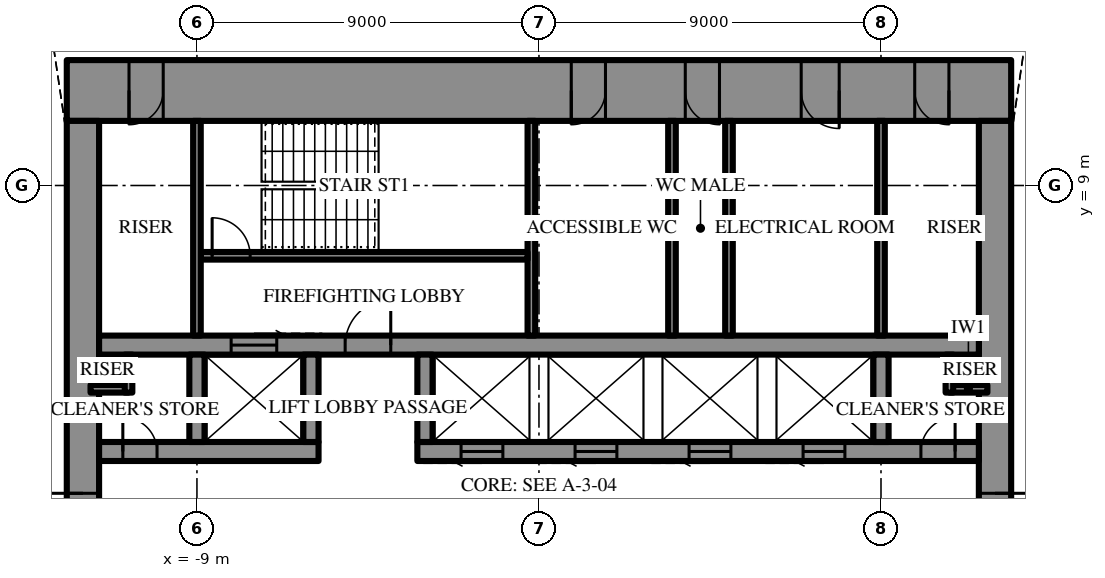
"""IFC4 building model, lengths in metres.
Left out: names, types, materials, properties, quantities, classifications, styles, units other than length and angle.
Written with IfcOpenShell. Run it as: python <this file> out.ifc"""

import sys

from ifc_helpers import new_model, si_unit, direction, frame, frame_2d, origin, place, context, subcontext, project, spatial, rectangle, extrude, element, fill, save


model = new_model("IFC4")
c1 = context("Model", 3, precision=1e-05, world=origin(), true_north=direction((0.0, 1.0)))
c2 = subcontext(c1, "Body", "Model", "MODEL_VIEW")
j1 = project(units=[si_unit("LENGTHUNIT", "METRE"), si_unit("PLANEANGLEUNIT", "RADIAN")], contexts=[c1])
p1 = place(None, origin())
s1 = spatial("IfcSite", under=j1, at=p1, CompositionType="ELEMENT")
p2 = place(p1, origin())
s2 = spatial("IfcBuilding", under=s1, at=p2, CompositionType="ELEMENT")
p3 = place(p2, frame((0.0, 0.0, 336.7)))
s3 = spatial("IfcBuildingStorey", under=s2, at=p3, CompositionType="ELEMENT", Elevation=336.7)
p4 = place(p3, frame((-12.425, 11.5, 0.0), z_axis=(0.0, 0.0, 1.0), x_axis=(1.0, 0.0, 0.0)))
e1 = element("IfcWall", 1, at=p4, inside=s3, PredefinedType="SHEAR", context=c2, shape_type="SweptSolid", body=[
    extrude(rectangle(XDim=24.85, YDim=1.6, at=frame_2d((12.425, 0.0))), origin(), (0.0, 0.0, 1.0), 4.2),
])
p5 = place(p4, frame((13.275, 0.0, 0.0)))
e2 = element("IfcOpeningElement", 2, at=p5, cuts=e1, PredefinedType="OPENING", context=c2, shape_type="SweptSolid", body=[
    extrude(rectangle(XDim=0.9, YDim=2.2, at=frame_2d((0.45, 1.1))), frame((0.0, 0.81, 0.0), z_axis=(0.0, -1.0, 0.0), x_axis=(1.0, 0.0, 0.0)), (0.0, 0.0, 1.0), 1.62),
])
p6 = place(p4, frame((16.275, 0.0, 0.0)))
e3 = element("IfcOpeningElement", 3, at=p6, cuts=e1, PredefinedType="OPENING", context=c2, shape_type="SweptSolid", body=[
    extrude(rectangle(XDim=0.9, YDim=2.2, at=frame_2d((0.45, 1.1))), frame((0.0, 0.81, 0.0), z_axis=(0.0, -1.0, 0.0), x_axis=(1.0, 0.0, 0.0)), (0.0, 0.0, 1.0), 1.62),
])
p7 = place(p4, frame((19.325, 0.0, 0.0)))
e4 = element("IfcOpeningElement", 4, at=p7, cuts=e1, PredefinedType="OPENING", context=c2, shape_type="SweptSolid", body=[
    extrude(rectangle(XDim=1.0, YDim=2.2, at=frame_2d((0.5, 1.1))), frame((0.0, 0.81, 0.0), z_axis=(0.0, -1.0, 0.0), x_axis=(1.0, 0.0, 0.0)), (0.0, 0.0, 1.0), 1.62),
])
p8 = place(p4, frame((1.637, 0.0, 0.0)))
e5 = element("IfcOpeningElement", 5, at=p8, cuts=e1, PredefinedType="OPENING", context=c2, shape_type="SweptSolid", body=[
    extrude(rectangle(XDim=0.9, YDim=2.2, at=frame_2d((0.45, 1.1))), frame((0.0, 0.81, 0.0), z_axis=(0.0, -1.0, 0.0), x_axis=(1.0, 0.0, 0.0)), (0.0, 0.0, 1.0), 1.62),
])
p9 = place(p4, frame((22.312, 0.0, 0.0)))
e6 = element("IfcOpeningElement", 6, at=p9, cuts=e1, PredefinedType="OPENING", context=c2, shape_type="SweptSolid", body=[
    extrude(rectangle(XDim=0.9, YDim=2.2, at=frame_2d((0.45, 1.1))), frame((0.0, 0.81, 0.0), z_axis=(0.0, -1.0, 0.0), x_axis=(1.0, 0.0, 0.0)), (0.0, 0.0, 1.0), 1.62),
])
p10 = place(p3, frame((12.0, -10.7, 0.0), z_axis=(0.0, 0.0, 1.0), x_axis=(0.0, 1.0, 0.0)))
e7 = element("IfcWall", 7, at=p10, inside=s3, PredefinedType="SHEAR", context=c2, shape_type="SweptSolid", body=[
    extrude(rectangle(XDim=21.4, YDim=0.85, at=frame_2d((10.7, 0.0))), origin(), (0.0, 0.0, 1.0), 4.2),
])
p11 = place(p10, frame((9.8, 0.0, 0.0)))
e8 = element("IfcOpeningElement", 8, at=p11, cuts=e7, PredefinedType="OPENING", context=c2, shape_type="SweptSolid", body=[
    extrude(rectangle(XDim=1.8, YDim=2.4, at=frame_2d((0.9, 1.2))), frame((0.0, 0.435, 0.0), z_axis=(0.0, -1.0, 0.0), x_axis=(1.0, 0.0, 0.0)), (0.0, 0.0, 1.0), 0.87),
])
p12 = place(p3, frame((-12.0, 10.7, 0.0), z_axis=(0.0, 0.0, 1.0), x_axis=(0.0, -1.0, 0.0)))
e9 = element("IfcWall", 9, at=p12, inside=s3, PredefinedType="SHEAR", context=c2, shape_type="SweptSolid", body=[
    extrude(rectangle(XDim=21.4, YDim=0.85, at=frame_2d((10.7, 0.0))), origin(), (0.0, 0.0, 1.0), 4.2),
])
p13 = place(p12, frame((9.8, 0.0, 0.0)))
e10 = element("IfcOpeningElement", 10, at=p13, cuts=e9, PredefinedType="OPENING", context=c2, shape_type="SweptSolid", body=[
    extrude(rectangle(XDim=1.8, YDim=2.4, at=frame_2d((0.9, 1.2))), frame((0.0, 0.435, 0.0), z_axis=(0.0, -1.0, 0.0), x_axis=(1.0, 0.0, 0.0)), (0.0, 0.0, 1.0), 0.87),
])
p14 = place(p3, frame((-11.575, 2.0, 0.0), z_axis=(0.0, 0.0, 1.0), x_axis=(1.0, 0.0, 0.0)))
e11 = element("IfcWall", 11, at=p14, inside=s3, PredefinedType="SHEAR", context=c2, shape_type="SweptSolid", body=[
    extrude(rectangle(XDim=5.775, YDim=0.5, at=frame_2d((2.887, 0.0))), origin(), (0.0, 0.0, 1.0), 4.2),
])
p15 = place(p14, frame((0.625, 0.0, 0.0)))
e12 = element("IfcOpeningElement", 12, at=p15, cuts=e11, PredefinedType="OPENING", context=c2, shape_type="SweptSolid", body=[
    extrude(rectangle(XDim=0.9, YDim=2.2, at=frame_2d((0.45, 1.1))), frame((0.0, 0.26, 0.0), z_axis=(0.0, -1.0, 0.0), x_axis=(1.0, 0.0, 0.0)), (0.0, 0.0, 1.0), 0.52),
])
p16 = place(p3, frame((-3.2, 2.0, 0.0), z_axis=(0.0, 0.0, 1.0), x_axis=(1.0, 0.0, 0.0)))
e13 = element("IfcWall", 13, at=p16, inside=s3, PredefinedType="SHEAR", context=c2, shape_type="SweptSolid", body=[
    extrude(rectangle(XDim=14.775, YDim=0.5, at=frame_2d((7.387, 0.0))), origin(), (0.0, 0.0, 1.0), 4.2),
])
p17 = place(p16, frame((13.25, 0.0, 0.0)))
e14 = element("IfcOpeningElement", 14, at=p17, cuts=e13, PredefinedType="OPENING", context=c2, shape_type="SweptSolid", body=[
    extrude(rectangle(XDim=0.9, YDim=2.2, at=frame_2d((0.45, 1.1))), frame((0.0, 0.26, 0.0), z_axis=(0.0, -1.0, 0.0), x_axis=(1.0, 0.0, 0.0)), (0.0, 0.0, 1.0), 0.52),
])
p18 = place(p16, frame((1.15, 0.0, 0.0)))
e15 = element("IfcOpeningElement", 15, at=p18, cuts=e13, PredefinedType="OPENING", context=c2, shape_type="SweptSolid", body=[
    extrude(rectangle(XDim=1.1, YDim=2.2, at=frame_2d((0.55, 1.1))), frame((0.0, 0.26, 0.0), z_axis=(0.0, -1.0, 0.0), x_axis=(1.0, 0.0, 0.0)), (0.0, 0.0, 1.0), 0.52),
])
p19 = place(p16, frame((4.15, 0.0, 0.0)))
e16 = element("IfcOpeningElement", 16, at=p19, cuts=e13, PredefinedType="OPENING", context=c2, shape_type="SweptSolid", body=[
    extrude(rectangle(XDim=1.1, YDim=2.2, at=frame_2d((0.55, 1.1))), frame((0.0, 0.26, 0.0), z_axis=(0.0, -1.0, 0.0), x_axis=(1.0, 0.0, 0.0)), (0.0, 0.0, 1.0), 0.52),
])
p20 = place(p16, frame((7.15, 0.0, 0.0)))
e17 = element("IfcOpeningElement", 17, at=p20, cuts=e13, PredefinedType="OPENING", context=c2, shape_type="SweptSolid", body=[
    extrude(rectangle(XDim=1.1, YDim=2.2, at=frame_2d((0.55, 1.1))), frame((0.0, 0.26, 0.0), z_axis=(0.0, -1.0, 0.0), x_axis=(1.0, 0.0, 0.0)), (0.0, 0.0, 1.0), 0.52),
])
p21 = place(p16, frame((10.15, 0.0, 0.0)))
e18 = element("IfcOpeningElement", 18, at=p21, cuts=e13, PredefinedType="OPENING", context=c2, shape_type="SweptSolid", body=[
    extrude(rectangle(XDim=1.1, YDim=2.2, at=frame_2d((0.55, 1.1))), frame((0.0, 0.26, 0.0), z_axis=(0.0, -1.0, 0.0), x_axis=(1.0, 0.0, 0.0)), (0.0, 0.0, 1.0), 0.52),
])
p22 = place(p3, frame((-11.575, 4.8, 0.0), z_axis=(0.0, 0.0, 1.0), x_axis=(1.0, 0.0, 0.0)))
e19 = element("IfcWall", 19, at=p22, inside=s3, PredefinedType="SHEAR", context=c2, shape_type="SweptSolid", body=[
    extrude(rectangle(XDim=23.15, YDim=0.5, at=frame_2d((11.575, 0.0))), origin(), (0.0, 0.0, 1.0), 4.2),
])
p23 = place(p22, frame((6.475, 0.0, 0.0)))
e20 = element("IfcOpeningElement", 20, at=p23, cuts=e19, PredefinedType="OPENING", context=c2, shape_type="SweptSolid", body=[
    extrude(rectangle(XDim=1.2, YDim=2.2, at=frame_2d((0.6, 1.1))), frame((0.0, 0.26, 0.0), z_axis=(0.0, -1.0, 0.0), x_axis=(1.0, 0.0, 0.0)), (0.0, 0.0, 1.0), 0.52),
])
p24 = place(p22, frame((3.475, 0.0, 0.0)))
e21 = element("IfcOpeningElement", 21, at=p24, cuts=e19, PredefinedType="OPENING", context=c2, shape_type="SweptSolid", body=[
    extrude(rectangle(XDim=1.2, YDim=2.2, at=frame_2d((0.6, 1.1))), frame((0.0, 0.26, 0.0), z_axis=(0.0, -1.0, 0.0), x_axis=(1.0, 0.0, 0.0)), (0.0, 0.0, 1.0), 0.52),
])
for number, where, z_axis, x_axis in (
    (22, (-9.0, 2.25, 0.0), (0.0, 0.0, 1.0), (0.0, 1.0, 0.0)),
    (23, (-6.0, 2.25, 0.0), (0.0, 0.0, 1.0), (0.0, 1.0, 0.0)),
    (24, (-3.0, 2.25, 0.0), (0.0, 0.0, 1.0), (0.0, 1.0, 0.0)),
    (25, (9.0, 2.25, 0.0), (0.0, 0.0, 1.0), (0.0, 1.0, 0.0)),
):
    element("IfcWall", number, at=place(p3, frame(where, z_axis=z_axis, x_axis=x_axis)), inside=s3, PredefinedType="SHEAR", context=c2, shape_type="SweptSolid", body=[
        extrude(rectangle(XDim=2.3, YDim=0.4, at=frame_2d((1.15, 0.0))), origin(), (0.0, 0.0, 1.0), 4.2),
    ])
p25 = place(p3, frame((-0.2, 5.05, 0.0), z_axis=(0.0, 0.0, 1.0), x_axis=(0.0, 1.0, 0.0)))
e26 = element("IfcWall", 26, at=p25, inside=s3, PredefinedType="SHEAR", context=c2, shape_type="SweptSolid", body=[
    extrude(rectangle(XDim=5.65, YDim=0.2, at=frame_2d((2.825, 0.0))), origin(), (0.0, 0.0, 1.0), 4.2),
])
p26 = place(p3, frame((-8.9, 7.15, 0.0), z_axis=(0.0, 0.0, 1.0), x_axis=(1.0, 0.0, 0.0)))
e27 = element("IfcWall", 27, at=p26, inside=s3, PredefinedType="SHEAR", context=c2, shape_type="SweptSolid", body=[
    extrude(rectangle(XDim=8.6, YDim=0.2, at=frame_2d((4.3, 0.0))), origin(), (0.0, 0.0, 1.0), 4.2),
])
p27 = place(p26, frame((0.3, 0.0, 0.0)))
e28 = element("IfcOpeningElement", 28, at=p27, cuts=e27, PredefinedType="OPENING", context=c2, shape_type="SweptSolid", body=[
    extrude(rectangle(XDim=1.0, YDim=2.2, at=frame_2d((0.5, 1.1))), frame((0.0, 0.11, 0.0), z_axis=(0.0, -1.0, 0.0), x_axis=(1.0, 0.0, 0.0)), (0.0, 0.0, 1.0), 0.22),
])
for number, where, z_axis, x_axis in (
    (29, (-9.0, 5.05, 0.0), (0.0, 0.0, 1.0), (0.0, 1.0, 0.0)),
    (30, (9.0, 5.05, 0.0), (0.0, 0.0, 1.0), (0.0, 1.0, 0.0)),
    (31, (3.5, 5.05, 0.0), (0.0, 0.0, 1.0), (0.0, 1.0, 0.0)),
    (32, (5.0, 5.05, 0.0), (0.0, 0.0, 1.0), (0.0, 1.0, 0.0)),
):
    element("IfcWall", number, at=place(p3, frame(where, z_axis=z_axis, x_axis=x_axis)), inside=s3, PredefinedType="PARTITIONING", context=c2, shape_type="SweptSolid", body=[
        extrude(rectangle(XDim=5.65, YDim=0.2, at=frame_2d((2.825, 0.0))), origin(), (0.0, 0.0, 1.0), 4.0),
    ])
for number, where, z_axis, x_axis in (
    (33, (-11.8, 3.65, 0.0), (0.0, 0.0, 1.0), (1.0, 0.0, 0.0)),
    (34, (-10.8, 3.55, 0.0), (0.0, 0.0, 1.0), (0.0, 1.0, 0.0)),
    (35, (10.8, 3.65, 0.0), (0.0, 0.0, 1.0), (1.0, 0.0, 0.0)),
    (36, (10.8, 3.55, 0.0), (0.0, 0.0, 1.0), (0.0, 1.0, 0.0)),
):
    element("IfcWall", number, at=place(p3, frame(where, z_axis=z_axis, x_axis=x_axis)), inside=s3, PredefinedType="PARTITIONING", context=c2, shape_type="SweptSolid", body=[
        extrude(rectangle(XDim=1.0, YDim=0.2, at=frame_2d((0.5, 0.0))), origin(), (0.0, 0.0, 1.0), 4.0),
    ])
p28 = place(p11, frame((1.8, 0.0, 0.0), z_axis=(0.0, 0.0, 1.0), x_axis=(-1.0, 0.0, 0.0)))
e37 = element("IfcDoor", 37, at=p28, inside=s3, OperationType="DOUBLE_DOOR_SINGLE_SWING", PredefinedType="DOOR", context=c2, shape_type="SweptSolid", body=[
    extrude(rectangle(XDim=1.8, YDim=2.4, at=frame_2d((0.9, 1.2))), frame((0.0, 0.025, 0.0), z_axis=(0.0, -1.0, 0.0), x_axis=(1.0, 0.0, 0.0)), (0.0, 0.0, 1.0), 0.05),
])
fill(e8, e37)
p29 = place(p13, frame((1.8, 0.0, 0.0), z_axis=(0.0, 0.0, 1.0), x_axis=(-1.0, 0.0, 0.0)))
e38 = element("IfcDoor", 38, at=p29, inside=s3, OperationType="DOUBLE_DOOR_SINGLE_SWING", PredefinedType="DOOR", context=c2, shape_type="SweptSolid", body=[
    extrude(rectangle(XDim=1.8, YDim=2.4, at=frame_2d((0.9, 1.2))), frame((0.0, 0.025, 0.0), z_axis=(0.0, -1.0, 0.0), x_axis=(1.0, 0.0, 0.0)), (0.0, 0.0, 1.0), 0.05),
])
fill(e10, e38)
p30 = place(p23, origin())
e39 = element("IfcDoor", 39, at=p30, inside=s3, OperationType="SINGLE_SWING_LEFT", PredefinedType="DOOR", context=c2, shape_type="SweptSolid", body=[
    extrude(rectangle(XDim=1.2, YDim=2.2, at=frame_2d((0.6, 1.1))), frame((0.0, 0.025, 0.0), z_axis=(0.0, -1.0, 0.0), x_axis=(1.0, 0.0, 0.0)), (0.0, 0.0, 1.0), 0.05),
])
fill(e20, e39)
p31 = place(p27, origin())
e40 = element("IfcDoor", 40, at=p31, inside=s3, OperationType="SINGLE_SWING_RIGHT", PredefinedType="DOOR", context=c2, shape_type="SweptSolid", body=[
    extrude(rectangle(XDim=1.0, YDim=2.2, at=frame_2d((0.5, 1.1))), frame((0.0, 0.025, 0.0), z_axis=(0.0, -1.0, 0.0), x_axis=(1.0, 0.0, 0.0)), (0.0, 0.0, 1.0), 0.05),
])
fill(e28, e40)
p32 = place(p5, frame((0.9, 0.0, 0.0), z_axis=(0.0, 0.0, 1.0), x_axis=(-1.0, 0.0, 0.0)))
e41 = element("IfcDoor", 41, at=p32, inside=s3, OperationType="SINGLE_SWING_LEFT", PredefinedType="DOOR", context=c2, shape_type="SweptSolid", body=[
    extrude(rectangle(XDim=0.9, YDim=2.2, at=frame_2d((0.45, 1.1))), frame((0.0, 0.025, 0.0), z_axis=(0.0, -1.0, 0.0), x_axis=(1.0, 0.0, 0.0)), (0.0, 0.0, 1.0), 0.05),
])
fill(e2, e41)
p33 = place(p6, frame((0.9, 0.0, 0.0), z_axis=(0.0, 0.0, 1.0), x_axis=(-1.0, 0.0, 0.0)))
e42 = element("IfcDoor", 42, at=p33, inside=s3, OperationType="SINGLE_SWING_RIGHT", PredefinedType="DOOR", context=c2, shape_type="SweptSolid", body=[
    extrude(rectangle(XDim=0.9, YDim=2.2, at=frame_2d((0.45, 1.1))), frame((0.0, 0.025, 0.0), z_axis=(0.0, -1.0, 0.0), x_axis=(1.0, 0.0, 0.0)), (0.0, 0.0, 1.0), 0.05),
])
fill(e3, e42)
p34 = place(p7, frame((1.0, 0.0, 0.0), z_axis=(0.0, 0.0, 1.0), x_axis=(-1.0, 0.0, 0.0)))
e43 = element("IfcDoor", 43, at=p34, inside=s3, OperationType="SINGLE_SWING_RIGHT", PredefinedType="DOOR", context=c2, shape_type="SweptSolid", body=[
    extrude(rectangle(XDim=1.0, YDim=2.2, at=frame_2d((0.5, 1.1))), frame((0.0, 0.025, 0.0), z_axis=(0.0, -1.0, 0.0), x_axis=(1.0, 0.0, 0.0)), (0.0, 0.0, 1.0), 0.05),
])
fill(e4, e43)
p35 = place(p8, frame((0.9, 0.0, 0.0), z_axis=(0.0, 0.0, 1.0), x_axis=(-1.0, 0.0, 0.0)))
e44 = element("IfcDoor", 44, at=p35, inside=s3, OperationType="SINGLE_SWING_LEFT", PredefinedType="DOOR", context=c2, shape_type="SweptSolid", body=[
    extrude(rectangle(XDim=0.9, YDim=2.2, at=frame_2d((0.45, 1.1))), frame((0.0, 0.025, 0.0), z_axis=(0.0, -1.0, 0.0), x_axis=(1.0, 0.0, 0.0)), (0.0, 0.0, 1.0), 0.05),
])
fill(e5, e44)
p36 = place(p9, frame((0.9, 0.0, 0.0), z_axis=(0.0, 0.0, 1.0), x_axis=(-1.0, 0.0, 0.0)))
e45 = element("IfcDoor", 45, at=p36, inside=s3, OperationType="SINGLE_SWING_RIGHT", PredefinedType="DOOR", context=c2, shape_type="SweptSolid", body=[
    extrude(rectangle(XDim=0.9, YDim=2.2, at=frame_2d((0.45, 1.1))), frame((0.0, 0.025, 0.0), z_axis=(0.0, -1.0, 0.0), x_axis=(1.0, 0.0, 0.0)), (0.0, 0.0, 1.0), 0.05),
])
fill(e6, e45)
p37 = place(p15, origin())
e46 = element("IfcDoor", 46, at=p37, inside=s3, OperationType="SINGLE_SWING_RIGHT", PredefinedType="DOOR", context=c2, shape_type="SweptSolid", body=[
    extrude(rectangle(XDim=0.9, YDim=2.2, at=frame_2d((0.45, 1.1))), frame((0.0, 0.025, 0.0), z_axis=(0.0, -1.0, 0.0), x_axis=(1.0, 0.0, 0.0)), (0.0, 0.0, 1.0), 0.05),
])
fill(e12, e46)
p38 = place(p17, origin())
e47 = element("IfcDoor", 47, at=p38, inside=s3, OperationType="SINGLE_SWING_LEFT", PredefinedType="DOOR", context=c2, shape_type="SweptSolid", body=[
    extrude(rectangle(XDim=0.9, YDim=2.2, at=frame_2d((0.45, 1.1))), frame((0.0, 0.025, 0.0), z_axis=(0.0, -1.0, 0.0), x_axis=(1.0, 0.0, 0.0)), (0.0, 0.0, 1.0), 0.05),
])
fill(e14, e47)
p39 = place(p24, origin())
e48 = element("IfcDoor", 48, at=p39, inside=s3, OperationType="SLIDING_TO_LEFT", PredefinedType="DOOR", context=c2, shape_type="SweptSolid", body=[
    extrude(rectangle(XDim=1.2, YDim=2.2, at=frame_2d((0.6, 1.1))), frame((0.0, 0.025, 0.0), z_axis=(0.0, -1.0, 0.0), x_axis=(1.0, 0.0, 0.0)), (0.0, 0.0, 1.0), 0.05),
])
fill(e21, e48)
p40 = place(p18, frame((1.1, 0.0, 0.0), z_axis=(0.0, 0.0, 1.0), x_axis=(-1.0, 0.0, 0.0)))
e49 = element("IfcDoor", 49, at=p40, inside=s3, OperationType="SLIDING_TO_LEFT", PredefinedType="DOOR", context=c2, shape_type="SweptSolid", body=[
    extrude(rectangle(XDim=1.1, YDim=2.2, at=frame_2d((0.55, 1.1))), frame((0.0, 0.025, 0.0), z_axis=(0.0, -1.0, 0.0), x_axis=(1.0, 0.0, 0.0)), (0.0, 0.0, 1.0), 0.05),
])
fill(e15, e49)
p41 = place(p19, frame((1.1, 0.0, 0.0), z_axis=(0.0, 0.0, 1.0), x_axis=(-1.0, 0.0, 0.0)))
e50 = element("IfcDoor", 50, at=p41, inside=s3, OperationType="SLIDING_TO_LEFT", PredefinedType="DOOR", context=c2, shape_type="SweptSolid", body=[
    extrude(rectangle(XDim=1.1, YDim=2.2, at=frame_2d((0.55, 1.1))), frame((0.0, 0.025, 0.0), z_axis=(0.0, -1.0, 0.0), x_axis=(1.0, 0.0, 0.0)), (0.0, 0.0, 1.0), 0.05),
])
fill(e16, e50)
p42 = place(p20, frame((1.1, 0.0, 0.0), z_axis=(0.0, 0.0, 1.0), x_axis=(-1.0, 0.0, 0.0)))
e51 = element("IfcDoor", 51, at=p42, inside=s3, OperationType="SLIDING_TO_LEFT", PredefinedType="DOOR", context=c2, shape_type="SweptSolid", body=[
    extrude(rectangle(XDim=1.1, YDim=2.2, at=frame_2d((0.55, 1.1))), frame((0.0, 0.025, 0.0), z_axis=(0.0, -1.0, 0.0), x_axis=(1.0, 0.0, 0.0)), (0.0, 0.0, 1.0), 0.05),
])
fill(e17, e51)
p43 = place(p21, frame((1.1, 0.0, 0.0), z_axis=(0.0, 0.0, 1.0), x_axis=(-1.0, 0.0, 0.0)))
e52 = element("IfcDoor", 52, at=p43, inside=s3, OperationType="SLIDING_TO_LEFT", PredefinedType="DOOR", context=c2, shape_type="SweptSolid", body=[
    extrude(rectangle(XDim=1.1, YDim=2.2, at=frame_2d((0.55, 1.1))), frame((0.0, 0.025, 0.0), z_axis=(0.0, -1.0, 0.0), x_axis=(1.0, 0.0, 0.0)), (0.0, 0.0, 1.0), 0.05),
])
fill(e18, e52)
save(model, sys.argv[1])
